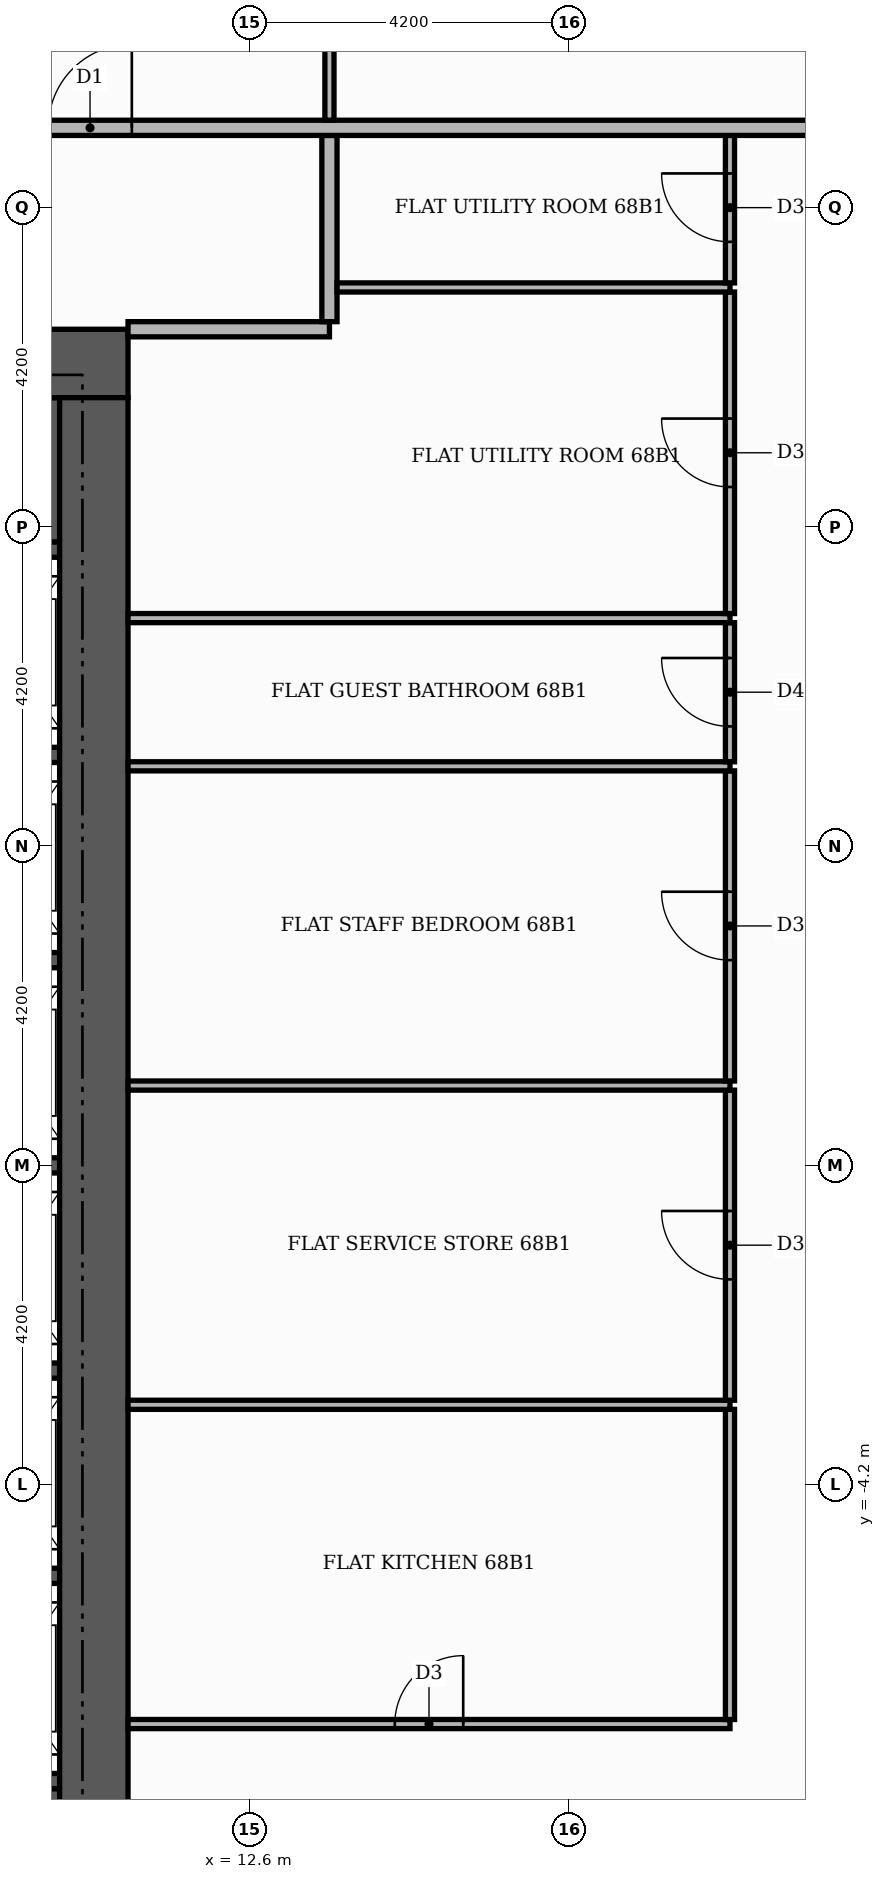
"""IFC4 building model, lengths in metres.
Left out: names, types, materials, properties, quantities, classifications, styles, units other than length and angle.
Written with IfcOpenShell. Run it as: python <this file> out.ifc"""

import sys

from ifc_helpers import new_model, si_unit, direction, frame, frame_2d, origin, place, context, subcontext, project, spatial, rectangle, extrude, element, fill, save


model = new_model("IFC4")
c1 = context("Model", 3, precision=1e-05, world=origin(), true_north=direction((0.0, 1.0)))
c2 = subcontext(c1, "Body", "Model", "MODEL_VIEW")
j1 = project(units=[si_unit("LENGTHUNIT", "METRE"), si_unit("PLANEANGLEUNIT", "RADIAN")], contexts=[c1])
p1 = place(None, origin())
s1 = spatial("IfcSite", under=j1, at=p1, CompositionType="ELEMENT")
p2 = place(p1, origin())
s2 = spatial("IfcBuilding", under=s1, at=p2, CompositionType="ELEMENT")
p3 = place(p2, frame((0.0, 0.0, 283.5)))
s3 = spatial("IfcBuildingStorey", under=s2, at=p3, CompositionType="ELEMENT", Elevation=283.5)
for number, where, z_axis, x_axis in (
    (1, (5.5, -9.15, 0.0), (0.0, 0.0, 1.0), (1.0, 0.0, 0.0)),
    (2, (5.5, 9.15, 0.0), (0.0, 0.0, 1.0), (1.0, 0.0, 0.0)),
):
    element("IfcWall", number, at=place(p3, frame(where, z_axis=z_axis, x_axis=x_axis)), inside=s3, PredefinedType="SHEAR", context=c2, shape_type="SweptSolid", body=[
        extrude(rectangle(XDim=4.6, YDim=1.9, at=frame_2d((2.3, 0.0))), origin(), (0.0, 0.0, 1.0), 3.4),
    ])
for number, where, z_axis, x_axis in (
    (3, (8.1, -8.1, 0.0), (0.0, 0.0, 1.0), (1.0, 0.0, 0.0)),
    (4, (8.1, -5.4, 0.0), (0.0, 0.0, 1.0), (1.0, 0.0, 0.0)),
    (5, (8.1, -2.7, 0.0), (0.0, 0.0, 1.0), (1.0, 0.0, 0.0)),
    (6, (8.1, 0.0, 0.0), (0.0, 0.0, 1.0), (1.0, 0.0, 0.0)),
    (7, (8.1, 2.7, 0.0), (0.0, 0.0, 1.0), (1.0, 0.0, 0.0)),
    (8, (8.1, 5.4, 0.0), (0.0, 0.0, 1.0), (1.0, 0.0, 0.0)),
    (9, (8.1, 8.1, 0.0), (0.0, 0.0, 1.0), (1.0, 0.0, 0.0)),
):
    element("IfcWall", number, at=place(p3, frame(where, z_axis=z_axis, x_axis=x_axis)), inside=s3, PredefinedType="SHEAR", context=c2, shape_type="SweptSolid", body=[
        extrude(rectangle(XDim=2.0, YDim=0.2, at=frame_2d((1.0, 0.0))), origin(), (0.0, 0.0, 1.0), 3.4),
    ])
p4 = place(p3, frame((-11.0, 10.55, 0.0), z_axis=(0.0, 0.0, 1.0), x_axis=(1.0, 0.0, 0.0)))
e10 = element("IfcWall", 10, at=p4, inside=s3, PredefinedType="SHEAR", context=c2, shape_type="SweptSolid", body=[
    extrude(rectangle(XDim=22.0, YDim=0.9, at=frame_2d((11.0, 0.0))), origin(), (0.0, 0.0, 1.0), 3.4),
])
p5 = place(p4, frame((13.3, 0.0, 0.0)))
e11 = element("IfcOpeningElement", 11, at=p5, cuts=e10, PredefinedType="OPENING", context=c2, shape_type="SweptSolid", body=[
    extrude(rectangle(XDim=1.8, YDim=2.2, at=frame_2d((0.9, 1.1))), frame((0.0, 0.46, 0.0), z_axis=(0.0, -1.0, 0.0), x_axis=(1.0, 0.0, 0.0)), (0.0, 0.0, 1.0), 0.92),
])
p6 = place(p3, frame((10.55, -10.1, 0.0), z_axis=(0.0, 0.0, 1.0), x_axis=(0.0, 1.0, 0.0)))
e12 = element("IfcWall", 12, at=p6, inside=s3, PredefinedType="SHEAR", context=c2, shape_type="SweptSolid", body=[
    extrude(rectangle(XDim=20.2, YDim=0.9, at=frame_2d((10.1, 0.0))), origin(), (0.0, 0.0, 1.0), 3.4),
])
p7 = place(p3, frame((11.0, -7.35, 0.0), z_axis=(0.0, 0.0, 1.0), x_axis=(1.0, 0.0, 0.0)))
e13 = element("IfcWall", 13, at=p7, inside=s3, PredefinedType="PARTITIONING", context=c2, shape_type="SweptSolid", body=[
    extrude(rectangle(XDim=7.92, YDim=0.12, at=frame_2d((3.96, 0.0))), origin(), (0.0, 0.0, 1.0), 3.4),
])
p8 = place(p7, frame((3.51, 0.0, 0.0)))
e14 = element("IfcOpeningElement", 14, at=p8, cuts=e13, PredefinedType="OPENING", context=c2, shape_type="SweptSolid", body=[
    extrude(rectangle(XDim=0.9, YDim=2.1, at=frame_2d((0.45, 1.05))), frame((0.0, 0.07, 0.0), z_axis=(0.0, -1.0, 0.0), x_axis=(1.0, 0.0, 0.0)), (0.0, 0.0, 1.0), 0.14),
])
p9 = place(p3, frame((18.92, -7.29, 0.0), z_axis=(0.0, 0.0, 1.0), x_axis=(0.0, 1.0, 0.0)))
e15 = element("IfcWall", 15, at=p9, inside=s3, PredefinedType="PARTITIONING", context=c2, shape_type="SweptSolid", body=[
    extrude(rectangle(XDim=4.08, YDim=0.12, at=frame_2d((2.04, 0.0))), origin(), (0.0, 0.0, 1.0), 3.4),
])
p10 = place(p3, frame((11.0, -3.15, 0.0), z_axis=(0.0, 0.0, 1.0), x_axis=(1.0, 0.0, 0.0)))
e16 = element("IfcWall", 16, at=p10, inside=s3, PredefinedType="PARTITIONING", context=c2, shape_type="SweptSolid", body=[
    extrude(rectangle(XDim=7.92, YDim=0.12, at=frame_2d((3.96, 0.0))), origin(), (0.0, 0.0, 1.0), 3.4),
])
p11 = place(p3, frame((18.92, -3.09, 0.0), z_axis=(0.0, 0.0, 1.0), x_axis=(0.0, 1.0, 0.0)))
e17 = element("IfcWall", 17, at=p11, inside=s3, PredefinedType="PARTITIONING", context=c2, shape_type="SweptSolid", body=[
    extrude(rectangle(XDim=4.08, YDim=0.12, at=frame_2d((2.04, 0.0))), origin(), (0.0, 0.0, 1.0), 3.4),
])
p12 = place(p11, frame((1.59, 0.0, 0.0)))
e18 = element("IfcOpeningElement", 18, at=p12, cuts=e17, PredefinedType="OPENING", context=c2, shape_type="SweptSolid", body=[
    extrude(rectangle(XDim=0.9, YDim=2.1, at=frame_2d((0.45, 1.05))), frame((0.0, 0.07, 0.0), z_axis=(0.0, -1.0, 0.0), x_axis=(1.0, 0.0, 0.0)), (0.0, 0.0, 1.0), 0.14),
])
p13 = place(p3, frame((11.0, 1.05, 0.0), z_axis=(0.0, 0.0, 1.0), x_axis=(1.0, 0.0, 0.0)))
e19 = element("IfcWall", 19, at=p13, inside=s3, PredefinedType="PARTITIONING", context=c2, shape_type="SweptSolid", body=[
    extrude(rectangle(XDim=7.92, YDim=0.12, at=frame_2d((3.96, 0.0))), origin(), (0.0, 0.0, 1.0), 3.4),
])
p14 = place(p3, frame((18.92, 1.11, 0.0), z_axis=(0.0, 0.0, 1.0), x_axis=(0.0, 1.0, 0.0)))
e20 = element("IfcWall", 20, at=p14, inside=s3, PredefinedType="PARTITIONING", context=c2, shape_type="SweptSolid", body=[
    extrude(rectangle(XDim=4.08, YDim=0.12, at=frame_2d((2.04, 0.0))), origin(), (0.0, 0.0, 1.0), 3.4),
])
p15 = place(p14, frame((1.59, 0.0, 0.0)))
e21 = element("IfcOpeningElement", 21, at=p15, cuts=e20, PredefinedType="OPENING", context=c2, shape_type="SweptSolid", body=[
    extrude(rectangle(XDim=0.9, YDim=2.1, at=frame_2d((0.45, 1.05))), frame((0.0, 0.07, 0.0), z_axis=(0.0, -1.0, 0.0), x_axis=(1.0, 0.0, 0.0)), (0.0, 0.0, 1.0), 0.14),
])
p16 = place(p3, frame((11.0, 5.25, 0.0), z_axis=(0.0, 0.0, 1.0), x_axis=(1.0, 0.0, 0.0)))
e22 = element("IfcWall", 22, at=p16, inside=s3, PredefinedType="PARTITIONING", context=c2, shape_type="SweptSolid", body=[
    extrude(rectangle(XDim=7.92, YDim=0.12, at=frame_2d((3.96, 0.0))), origin(), (0.0, 0.0, 1.0), 3.4),
])
p17 = place(p3, frame((18.92, 5.31, 0.0), z_axis=(0.0, 0.0, 1.0), x_axis=(0.0, 1.0, 0.0)))
e23 = element("IfcWall", 23, at=p17, inside=s3, PredefinedType="PARTITIONING", context=c2, shape_type="SweptSolid", body=[
    extrude(rectangle(XDim=1.83, YDim=0.12, at=frame_2d((0.915, 0.0))), origin(), (0.0, 0.0, 1.0), 3.4),
])
p18 = place(p17, frame((0.465, 0.0, 0.0)))
e24 = element("IfcOpeningElement", 24, at=p18, cuts=e23, PredefinedType="OPENING", context=c2, shape_type="SweptSolid", body=[
    extrude(rectangle(XDim=0.9, YDim=2.1, at=frame_2d((0.45, 1.05))), frame((0.0, 0.07, 0.0), z_axis=(0.0, -1.0, 0.0), x_axis=(1.0, 0.0, 0.0)), (0.0, 0.0, 1.0), 0.14),
])
p19 = place(p3, frame((11.0, 7.2, 0.0), z_axis=(0.0, 0.0, 1.0), x_axis=(1.0, 0.0, 0.0)))
e25 = element("IfcWall", 25, at=p19, inside=s3, PredefinedType="PARTITIONING", context=c2, shape_type="SweptSolid", body=[
    extrude(rectangle(XDim=7.92, YDim=0.12, at=frame_2d((3.96, 0.0))), origin(), (0.0, 0.0, 1.0), 3.4),
])
p20 = place(p3, frame((18.92, 7.26, 0.0), z_axis=(0.0, 0.0, 1.0), x_axis=(0.0, 1.0, 0.0)))
e26 = element("IfcWall", 26, at=p20, inside=s3, PredefinedType="PARTITIONING", context=c2, shape_type="SweptSolid", body=[
    extrude(rectangle(XDim=4.23, YDim=0.12, at=frame_2d((2.115, 0.0))), origin(), (0.0, 0.0, 1.0), 3.4),
])
p21 = place(p20, frame((1.665, 0.0, 0.0)))
e27 = element("IfcOpeningElement", 27, at=p21, cuts=e26, PredefinedType="OPENING", context=c2, shape_type="SweptSolid", body=[
    extrude(rectangle(XDim=0.9, YDim=2.1, at=frame_2d((0.45, 1.05))), frame((0.0, 0.07, 0.0), z_axis=(0.0, -1.0, 0.0), x_axis=(1.0, 0.0, 0.0)), (0.0, 0.0, 1.0), 0.14),
])
p22 = place(p3, frame((11.0, 11.0, 0.0), z_axis=(0.0, 0.0, 1.0), x_axis=(1.0, 0.0, 0.0)))
e28 = element("IfcWall", 28, at=p22, inside=s3, PredefinedType="PARTITIONING", context=c2, shape_type="SweptSolid", body=[
    extrude(rectangle(XDim=2.65, YDim=0.2, at=frame_2d((1.325, 0.0))), origin(), (0.0, 0.0, 1.0), 3.4),
])
p23 = place(p3, frame((13.65, 11.1, 0.0), z_axis=(0.0, 0.0, 1.0), x_axis=(0.0, 1.0, 0.0)))
e29 = element("IfcWall", 29, at=p23, inside=s3, PredefinedType="PARTITIONING", context=c2, shape_type="SweptSolid", body=[
    extrude(rectangle(XDim=2.45, YDim=0.2, at=frame_2d((1.225, 0.0))), origin(), (0.0, 0.0, 1.0), 3.4),
])
p24 = place(p3, frame((13.75, 11.55, 0.0), z_axis=(0.0, 0.0, 1.0), x_axis=(1.0, 0.0, 0.0)))
e30 = element("IfcWall", 30, at=p24, inside=s3, PredefinedType="PARTITIONING", context=c2, shape_type="SweptSolid", body=[
    extrude(rectangle(XDim=5.17, YDim=0.12, at=frame_2d((2.585, 0.0))), origin(), (0.0, 0.0, 1.0), 3.4),
])
p25 = place(p3, frame((18.92, 11.61, 0.0), z_axis=(0.0, 0.0, 1.0), x_axis=(0.0, 1.0, 0.0)))
e31 = element("IfcWall", 31, at=p25, inside=s3, PredefinedType="PARTITIONING", context=c2, shape_type="SweptSolid", body=[
    extrude(rectangle(XDim=1.94, YDim=0.12, at=frame_2d((0.97, 0.0))), origin(), (0.0, 0.0, 1.0), 3.4),
])
p26 = place(p25, frame((0.54, 0.0, 0.0)))
e32 = element("IfcOpeningElement", 32, at=p26, cuts=e31, PredefinedType="OPENING", context=c2, shape_type="SweptSolid", body=[
    extrude(rectangle(XDim=0.9, YDim=2.1, at=frame_2d((0.45, 1.05))), frame((0.0, 0.07, 0.0), z_axis=(0.0, -1.0, 0.0), x_axis=(1.0, 0.0, 0.0)), (0.0, 0.0, 1.0), 0.14),
])
p27 = place(p3, frame((-13.65, 13.65, 0.0), z_axis=(0.0, 0.0, 1.0), x_axis=(1.0, 0.0, 0.0)))
e33 = element("IfcWall", 33, at=p27, inside=s3, PredefinedType="PARTITIONING", context=c2, shape_type="SweptSolid", body=[
    extrude(rectangle(XDim=39.07, YDim=0.2, at=frame_2d((19.535, 0.0))), origin(), (0.0, 0.0, 1.0), 3.4),
])
p28 = place(p27, frame((23.6, 0.0, 0.0)))
e34 = element("IfcOpeningElement", 34, at=p28, cuts=e33, PredefinedType="OPENING", context=c2, shape_type="SweptSolid", body=[
    extrude(rectangle(XDim=1.1, YDim=2.4, at=frame_2d((0.55, 1.2))), frame((0.0, 0.11, 0.0), z_axis=(0.0, -1.0, 0.0), x_axis=(1.0, 0.0, 0.0)), (0.0, 0.0, 1.0), 0.22),
])
p29 = place(p3, frame((13.65, 13.75, 0.0), z_axis=(0.0, 0.0, 1.0), x_axis=(0.0, 1.0, 0.0)))
e35 = element("IfcWall", 35, at=p29, inside=s3, PredefinedType="PARTITIONING", context=c2, shape_type="SweptSolid", body=[
    extrude(rectangle(XDim=6.31, YDim=0.12, at=frame_2d((3.155, 0.0))), origin(), (0.0, 0.0, 1.0), 3.4),
])
p30 = place(p29, frame((2.685, 0.0, 0.0)))
e36 = element("IfcOpeningElement", 36, at=p30, cuts=e35, PredefinedType="OPENING", context=c2, shape_type="SweptSolid", body=[
    extrude(rectangle(XDim=0.9, YDim=2.1, at=frame_2d((0.45, 1.05))), frame((0.0, 0.07, 0.0), z_axis=(0.0, -1.0, 0.0), x_axis=(1.0, 0.0, 0.0)), (0.0, 0.0, 1.0), 0.14),
])
p31 = place(p8, origin())
e37 = element("IfcDoor", 37, at=p31, inside=s3, OperationType="SINGLE_SWING_RIGHT", PredefinedType="DOOR", context=c2, shape_type="SweptSolid", body=[
    extrude(rectangle(XDim=0.9, YDim=2.1, at=frame_2d((0.45, 1.05))), frame((0.0, 0.025, 0.0), z_axis=(0.0, -1.0, 0.0), x_axis=(1.0, 0.0, 0.0)), (0.0, 0.0, 1.0), 0.05),
])
fill(e14, e37)
p32 = place(p12, origin())
e38 = element("IfcDoor", 38, at=p32, inside=s3, OperationType="SINGLE_SWING_RIGHT", PredefinedType="DOOR", context=c2, shape_type="SweptSolid", body=[
    extrude(rectangle(XDim=0.9, YDim=2.1, at=frame_2d((0.45, 1.05))), frame((0.0, 0.025, 0.0), z_axis=(0.0, -1.0, 0.0), x_axis=(1.0, 0.0, 0.0)), (0.0, 0.0, 1.0), 0.05),
])
fill(e18, e38)
p33 = place(p15, origin())
e39 = element("IfcDoor", 39, at=p33, inside=s3, OperationType="SINGLE_SWING_RIGHT", PredefinedType="DOOR", context=c2, shape_type="SweptSolid", body=[
    extrude(rectangle(XDim=0.9, YDim=2.1, at=frame_2d((0.45, 1.05))), frame((0.0, 0.025, 0.0), z_axis=(0.0, -1.0, 0.0), x_axis=(1.0, 0.0, 0.0)), (0.0, 0.0, 1.0), 0.05),
])
fill(e21, e39)
p34 = place(p18, origin())
e40 = element("IfcDoor", 40, at=p34, inside=s3, OperationType="SINGLE_SWING_RIGHT", PredefinedType="DOOR", context=c2, shape_type="SweptSolid", body=[
    extrude(rectangle(XDim=0.9, YDim=2.1, at=frame_2d((0.45, 1.05))), frame((0.0, 0.025, 0.0), z_axis=(0.0, -1.0, 0.0), x_axis=(1.0, 0.0, 0.0)), (0.0, 0.0, 1.0), 0.05),
])
fill(e24, e40)
p35 = place(p21, origin())
e41 = element("IfcDoor", 41, at=p35, inside=s3, OperationType="SINGLE_SWING_RIGHT", PredefinedType="DOOR", context=c2, shape_type="SweptSolid", body=[
    extrude(rectangle(XDim=0.9, YDim=2.1, at=frame_2d((0.45, 1.05))), frame((0.0, 0.025, 0.0), z_axis=(0.0, -1.0, 0.0), x_axis=(1.0, 0.0, 0.0)), (0.0, 0.0, 1.0), 0.05),
])
fill(e27, e41)
p36 = place(p26, origin())
e42 = element("IfcDoor", 42, at=p36, inside=s3, OperationType="SINGLE_SWING_RIGHT", PredefinedType="DOOR", context=c2, shape_type="SweptSolid", body=[
    extrude(rectangle(XDim=0.9, YDim=2.1, at=frame_2d((0.45, 1.05))), frame((0.0, 0.025, 0.0), z_axis=(0.0, -1.0, 0.0), x_axis=(1.0, 0.0, 0.0)), (0.0, 0.0, 1.0), 0.05),
])
fill(e32, e42)
p37 = place(p28, origin())
e43 = element("IfcDoor", 43, at=p37, inside=s3, OperationType="SINGLE_SWING_RIGHT", PredefinedType="DOOR", context=c2, shape_type="SweptSolid", body=[
    extrude(rectangle(XDim=1.1, YDim=2.4, at=frame_2d((0.55, 1.2))), frame((0.0, 0.025, 0.0), z_axis=(0.0, -1.0, 0.0), x_axis=(1.0, 0.0, 0.0)), (0.0, 0.0, 1.0), 0.05),
])
fill(e34, e43)
save(model, sys.argv[1])
